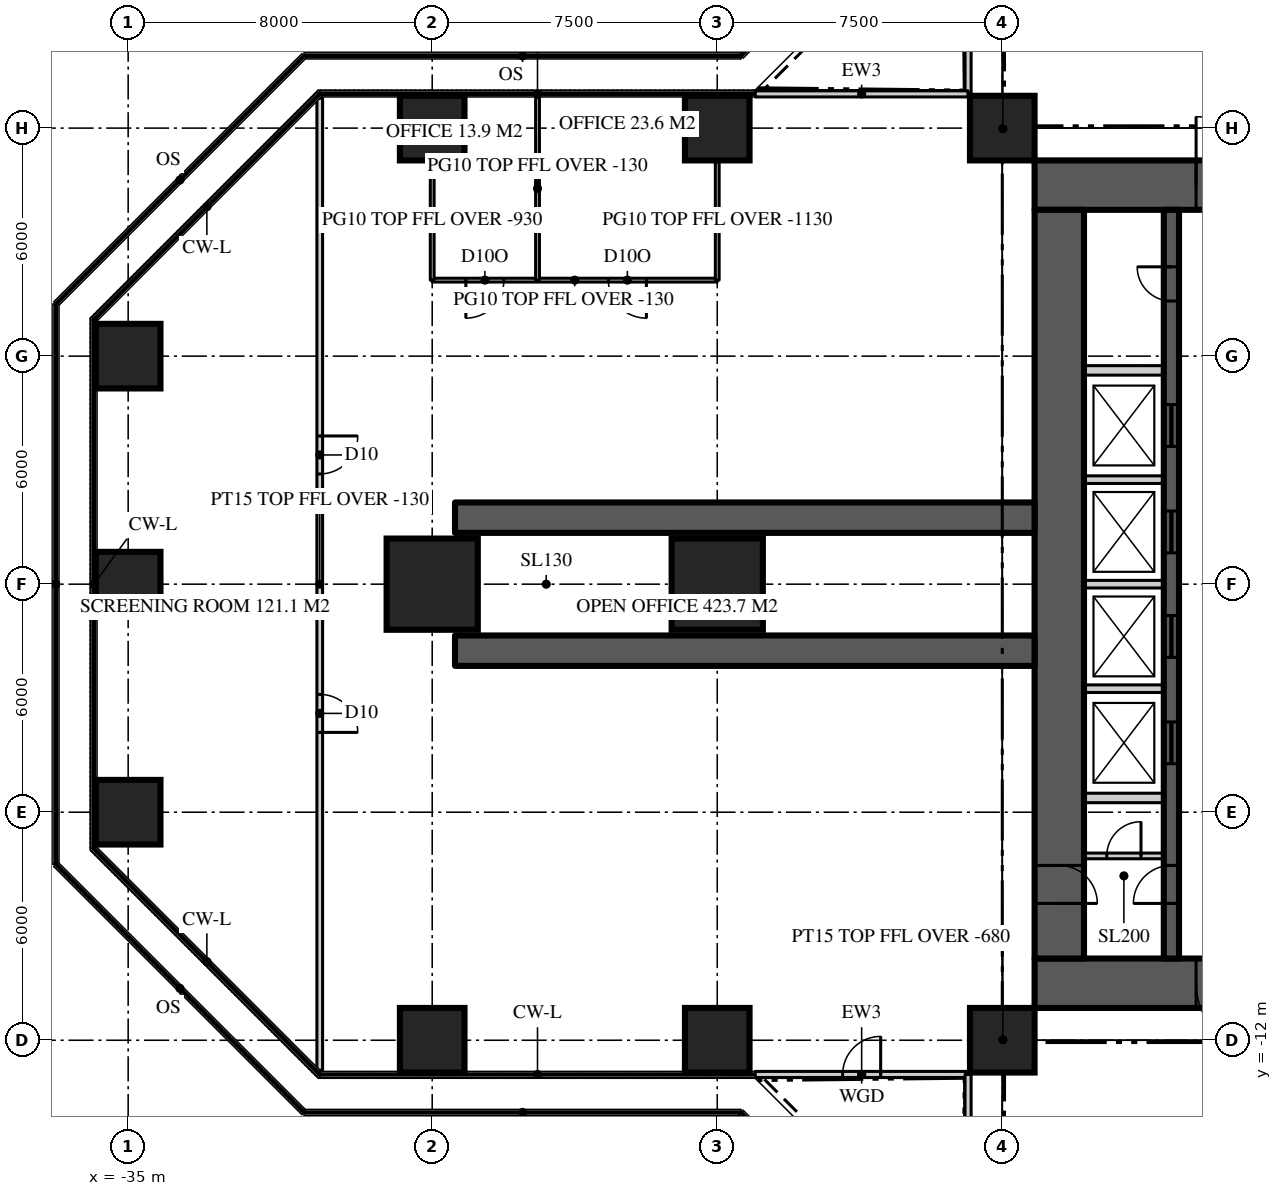
"""IFC4 building model, lengths in metres.
Left out: names, types, materials, properties, quantities, classifications, styles, units other than length and angle.
Written with IfcOpenShell. Run it as: python <this file> out.ifc"""

import sys

from ifc_helpers import new_model, si_unit, direction, frame, frame_2d, origin, origin_2d, place, context, subcontext, project, spatial, rectangle, extrude, element, fill, save


model = new_model("IFC4")
c1 = context("Model", 3, precision=1e-05, world=origin(), true_north=direction((0.0, 1.0)))
c2 = subcontext(c1, "Body", "Model", "MODEL_VIEW")
j1 = project(units=[si_unit("LENGTHUNIT", "METRE"), si_unit("PLANEANGLEUNIT", "RADIAN")], contexts=[c1])
p1 = place(None, origin())
s1 = spatial("IfcSite", under=j1, at=p1, CompositionType="ELEMENT")
p2 = place(p1, origin())
s2 = spatial("IfcBuilding", under=s1, at=p2, CompositionType="ELEMENT")
p3 = place(p2, frame((0.0, 0.0, 86.4)))
s3 = spatial("IfcBuildingStorey", under=s2, at=p3, CompositionType="ELEMENT", Elevation=86.4)
p4 = place(p3, frame((-11.15, 10.5, 0.0), z_axis=(0.0, 0.0, 1.0), x_axis=(1.0, 0.0, 0.0)))
e1 = element("IfcWall", 1, at=p4, inside=s3, PredefinedType="SHEAR", context=c2, shape_type="SweptSolid", body=[
    extrude(rectangle(XDim=22.3, YDim=1.3, at=frame_2d((11.15, 0.0))), origin(), (0.0, 0.0, 1.0), 3.9),
])
p5 = place(p4, frame((4.25, 0.0, 0.0)))
e2 = element("IfcOpeningElement", 2, at=p5, cuts=e1, PredefinedType="OPENING", context=c2, shape_type="SweptSolid", body=[
    extrude(rectangle(XDim=1.8, YDim=2.2, at=frame_2d((0.9, 1.1))), frame((0.0, 0.66, 0.0), z_axis=(0.0, -1.0, 0.0), x_axis=(1.0, 0.0, 0.0)), (0.0, 0.0, 1.0), 1.32),
])
p6 = place(p4, frame((16.25, 0.0, 0.0)))
e3 = element("IfcOpeningElement", 3, at=p6, cuts=e1, PredefinedType="OPENING", context=c2, shape_type="SweptSolid", body=[
    extrude(rectangle(XDim=1.8, YDim=2.2, at=frame_2d((0.9, 1.1))), frame((0.0, 0.66, 0.0), z_axis=(0.0, -1.0, 0.0), x_axis=(1.0, 0.0, 0.0)), (0.0, 0.0, 1.0), 1.32),
])
p7 = place(p3, frame((11.15, -10.5, 0.0), z_axis=(0.0, 0.0, 1.0), x_axis=(-1.0, 0.0, 0.0)))
e4 = element("IfcWall", 4, at=p7, inside=s3, PredefinedType="SHEAR", context=c2, shape_type="SweptSolid", body=[
    extrude(rectangle(XDim=22.3, YDim=1.3, at=frame_2d((11.15, 0.0))), origin(), (0.0, 0.0, 1.0), 3.9),
])
p8 = place(p7, frame((16.25, 0.0, 0.0)))
e5 = element("IfcOpeningElement", 5, at=p8, cuts=e4, PredefinedType="OPENING", context=c2, shape_type="SweptSolid", body=[
    extrude(rectangle(XDim=1.8, YDim=2.2, at=frame_2d((0.9, 1.1))), frame((0.0, 0.66, 0.0), z_axis=(0.0, -1.0, 0.0), x_axis=(1.0, 0.0, 0.0)), (0.0, 0.0, 1.0), 1.32),
])
p9 = place(p7, frame((4.25, 0.0, 0.0)))
e6 = element("IfcOpeningElement", 6, at=p9, cuts=e4, PredefinedType="OPENING", context=c2, shape_type="SweptSolid", body=[
    extrude(rectangle(XDim=1.8, YDim=2.2, at=frame_2d((0.9, 1.1))), frame((0.0, 0.66, 0.0), z_axis=(0.0, -1.0, 0.0), x_axis=(1.0, 0.0, 0.0)), (0.0, 0.0, 1.0), 1.32),
])
p10 = place(p3, frame((-10.5, 9.85, 0.0), z_axis=(0.0, 0.0, 1.0), x_axis=(0.0, -1.0, 0.0)))
e7 = element("IfcWall", 7, at=p10, inside=s3, PredefinedType="SHEAR", context=c2, shape_type="SweptSolid", body=[
    extrude(rectangle(XDim=19.7, YDim=1.3, at=frame_2d((9.85, 0.0))), origin(), (0.0, 0.0, 1.0), 3.9),
])
p11 = place(p10, frame((17.25, 0.0, 0.0)))
e8 = element("IfcOpeningElement", 8, at=p11, cuts=e7, PredefinedType="OPENING", context=c2, shape_type="SweptSolid", body=[
    extrude(rectangle(XDim=1.0, YDim=2.2, at=frame_2d((0.5, 1.1))), frame((0.0, 0.66, 0.0), z_axis=(0.0, -1.0, 0.0), x_axis=(1.0, 0.0, 0.0)), (0.0, 0.0, 1.0), 1.32),
])
for number, where, z_axis, x_axis in (
    (9, (-11.15, 1.75, 0.0), (0.0, 0.0, 1.0), (-1.0, 0.0, 0.0)),
    (10, (-11.15, -1.75, 0.0), (0.0, 0.0, 1.0), (-1.0, 0.0, 0.0)),
):
    element("IfcWall", number, at=place(p3, frame(where, z_axis=z_axis, x_axis=x_axis)), inside=s3, PredefinedType="SHEAR", context=c2, shape_type="SweptSolid", body=[
        extrude(rectangle(XDim=15.25, YDim=0.8, at=frame_2d((7.625, 0.0))), origin(), (0.0, 0.0, 1.0), 3.9),
    ])
for number, where, z_axis, x_axis in (
    (11, (-27.0, -12.0, 0.0), (0.0, 0.0, 1.0), (1.0, 0.0, 0.0)),
    (12, (-19.5, -12.0, 0.0), (0.0, 0.0, 1.0), (1.0, 0.0, 0.0)),
    (13, (-12.0, -12.0, 0.0), (0.0, 0.0, 1.0), (1.0, 0.0, 0.0)),
    (14, (-35.0, -6.0, 0.0), (0.0, 0.0, 1.0), (1.0, 0.0, 0.0)),
    (15, (-35.0, 0.0, 0.0), (0.0, 0.0, 1.0), (1.0, 0.0, 0.0)),
):
    element("IfcColumn", number, at=place(p3, frame(where, z_axis=z_axis, x_axis=x_axis)), inside=s3, PredefinedType="COLUMN", context=c2, shape_type="SweptSolid", body=[
        extrude(rectangle(XDim=1.7, YDim=1.7, at=origin_2d()), origin(), (0.0, 0.0, 1.0), 3.9),
    ])
for number, where, z_axis, x_axis in (
    (16, (-27.0, 0.0, 0.0), (0.0, 0.0, 1.0), (1.0, 0.0, 0.0)),
    (17, (-19.5, 0.0, 0.0), (0.0, 0.0, 1.0), (1.0, 0.0, 0.0)),
):
    element("IfcColumn", number, at=place(p3, frame(where, z_axis=z_axis, x_axis=x_axis)), inside=s3, PredefinedType="COLUMN", context=c2, shape_type="SweptSolid", body=[
        extrude(rectangle(XDim=2.4, YDim=2.4, at=origin_2d()), origin(), (0.0, 0.0, 1.0), 3.9),
    ])
for number, where, z_axis, x_axis in (
    (18, (-35.0, 6.0, 0.0), (0.0, 0.0, 1.0), (1.0, 0.0, 0.0)),
    (19, (-27.0, 12.0, 0.0), (0.0, 0.0, 1.0), (1.0, 0.0, 0.0)),
    (20, (-19.5, 12.0, 0.0), (0.0, 0.0, 1.0), (1.0, 0.0, 0.0)),
    (21, (-12.0, 12.0, 0.0), (0.0, 0.0, 1.0), (1.0, 0.0, 0.0)),
):
    element("IfcColumn", number, at=place(p3, frame(where, z_axis=z_axis, x_axis=x_axis)), inside=s3, PredefinedType="COLUMN", context=c2, shape_type="SweptSolid", body=[
        extrude(rectangle(XDim=1.7, YDim=1.7, at=origin_2d()), origin(), (0.0, 0.0, 1.0), 3.9),
    ])
p12 = place(p3, frame((-12.9, 18.5, 0.0), z_axis=(0.0, 0.0, 1.0), x_axis=(0.0, -1.0, 0.0)))
e22 = element("IfcWall", 22, at=p12, inside=s3, PredefinedType="SOLIDWALL", context=c2, shape_type="SweptSolid", body=[
    extrude(rectangle(XDim=5.6, YDim=0.16, at=frame_2d((2.8, 0.0))), origin(), (0.0, 0.0, 1.0), 3.77),
])
p13 = place(p12, frame((2.3, 0.0, 0.0)))
e23 = element("IfcOpeningElement", 23, at=p13, cuts=e22, PredefinedType="OPENING", context=c2, shape_type="SweptSolid", body=[
    extrude(rectangle(XDim=1.0, YDim=2.2, at=frame_2d((0.5, 1.1))), frame((0.0, 0.09, 0.0), z_axis=(0.0, -1.0, 0.0), x_axis=(1.0, 0.0, 0.0)), (0.0, 0.0, 1.0), 0.18),
])
p14 = place(p3, frame((-12.9, 12.9, 0.0), z_axis=(0.0, 0.0, 1.0), x_axis=(-1.0, 0.0, 0.0)))
e24 = element("IfcWall", 24, at=p14, inside=s3, PredefinedType="SOLIDWALL", context=c2, shape_type="SweptSolid", body=[
    extrude(rectangle(XDim=5.6, YDim=0.16, at=frame_2d((2.8, 0.0))), origin(), (0.0, 0.0, 1.0), 3.77),
])
p15 = place(p3, frame((-18.5, -12.9, 0.0), z_axis=(0.0, 0.0, 1.0), x_axis=(1.0, 0.0, 0.0)))
e25 = element("IfcWall", 25, at=p15, inside=s3, PredefinedType="SOLIDWALL", context=c2, shape_type="SweptSolid", body=[
    extrude(rectangle(XDim=5.6, YDim=0.16, at=frame_2d((2.8, 0.0))), origin(), (0.0, 0.0, 1.0), 3.77),
])
p16 = place(p15, frame((2.3, 0.0, 0.0)))
e26 = element("IfcOpeningElement", 26, at=p16, cuts=e25, PredefinedType="OPENING", context=c2, shape_type="SweptSolid", body=[
    extrude(rectangle(XDim=1.0, YDim=2.2, at=frame_2d((0.5, 1.1))), frame((0.0, 0.09, 0.0), z_axis=(0.0, -1.0, 0.0), x_axis=(1.0, 0.0, 0.0)), (0.0, 0.0, 1.0), 0.18),
])
p17 = place(p3, frame((-12.9, -12.9, 0.0), z_axis=(0.0, 0.0, 1.0), x_axis=(0.0, -1.0, 0.0)))
e27 = element("IfcWall", 27, at=p17, inside=s3, PredefinedType="SOLIDWALL", context=c2, shape_type="SweptSolid", body=[
    extrude(rectangle(XDim=5.6, YDim=0.16, at=frame_2d((2.8, 0.0))), origin(), (0.0, 0.0, 1.0), 3.77),
])
p18 = place(p3, frame((-7.55, -9.85, 0.0), z_axis=(0.0, 0.0, 1.0), x_axis=(0.0, 1.0, 0.0)))
e28 = element("IfcWall", 28, at=p18, inside=s3, PredefinedType="SHEAR", context=c2, shape_type="SweptSolid", body=[
    extrude(rectangle(XDim=19.7, YDim=0.4, at=frame_2d((9.85, 0.0))), origin(), (0.0, 0.0, 1.0), 3.9),
])
p19 = place(p18, frame((1.45, 0.0, 0.0)))
e29 = element("IfcOpeningElement", 29, at=p19, cuts=e28, PredefinedType="OPENING", context=c2, shape_type="SweptSolid", body=[
    extrude(rectangle(XDim=1.0, YDim=2.2, at=frame_2d((0.5, 1.1))), frame((0.0, 0.21, 0.0), z_axis=(0.0, -1.0, 0.0), x_axis=(1.0, 0.0, 0.0)), (0.0, 0.0, 1.0), 0.42),
])
p20 = place(p18, frame((17.3, 0.0, 0.0)))
e30 = element("IfcOpeningElement", 30, at=p20, cuts=e28, PredefinedType="OPENING", context=c2, shape_type="SweptSolid", body=[
    extrude(rectangle(XDim=0.9, YDim=2.1, at=frame_2d((0.45, 1.05))), frame((0.0, 0.21, 0.0), z_axis=(0.0, -1.0, 0.0), x_axis=(1.0, 0.0, 0.0)), (0.0, 0.0, 1.0), 0.42),
])
p21 = place(p18, frame((5.125, 0.0, 0.0)))
e31 = element("IfcOpeningElement", 31, at=p21, cuts=e28, PredefinedType="OPENING", context=c2, shape_type="SweptSolid", body=[
    extrude(rectangle(XDim=1.1, YDim=2.2, at=frame_2d((0.55, 1.1))), frame((0.0, 0.21, 0.0), z_axis=(0.0, -1.0, 0.0), x_axis=(1.0, 0.0, 0.0)), (0.0, 0.0, 1.0), 0.42),
])
p22 = place(p18, frame((7.925, 0.0, 0.0)))
e32 = element("IfcOpeningElement", 32, at=p22, cuts=e28, PredefinedType="OPENING", context=c2, shape_type="SweptSolid", body=[
    extrude(rectangle(XDim=1.1, YDim=2.2, at=frame_2d((0.55, 1.1))), frame((0.0, 0.21, 0.0), z_axis=(0.0, -1.0, 0.0), x_axis=(1.0, 0.0, 0.0)), (0.0, 0.0, 1.0), 0.42),
])
p23 = place(p18, frame((10.675, 0.0, 0.0)))
e33 = element("IfcOpeningElement", 33, at=p23, cuts=e28, PredefinedType="OPENING", context=c2, shape_type="SweptSolid", body=[
    extrude(rectangle(XDim=1.1, YDim=2.2, at=frame_2d((0.55, 1.1))), frame((0.0, 0.21, 0.0), z_axis=(0.0, -1.0, 0.0), x_axis=(1.0, 0.0, 0.0)), (0.0, 0.0, 1.0), 0.42),
])
p24 = place(p18, frame((13.475, 0.0, 0.0)))
e34 = element("IfcOpeningElement", 34, at=p24, cuts=e28, PredefinedType="OPENING", context=c2, shape_type="SweptSolid", body=[
    extrude(rectangle(XDim=1.1, YDim=2.2, at=frame_2d((0.55, 1.1))), frame((0.0, 0.21, 0.0), z_axis=(0.0, -1.0, 0.0), x_axis=(1.0, 0.0, 0.0)), (0.0, 0.0, 1.0), 0.42),
])
for number, where, z_axis, x_axis in (
    (35, (-9.85, 5.625, 0.0), (0.0, 0.0, 1.0), (1.0, 0.0, 0.0)),
    (36, (-9.85, -5.625, 0.0), (0.0, 0.0, 1.0), (1.0, 0.0, 0.0)),
):
    element("IfcWall", number, at=place(p3, frame(where, z_axis=z_axis, x_axis=x_axis)), inside=s3, PredefinedType="SOLIDWALL", context=c2, shape_type="SweptSolid", body=[
        extrude(rectangle(XDim=2.1, YDim=0.25, at=frame_2d((1.05, 0.0))), origin(), (0.0, 0.0, 1.0), 3.7),
    ])
for number, where, z_axis, x_axis in (
    (37, (-9.85, -2.75, 0.0), (0.0, 0.0, 1.0), (1.0, 0.0, 0.0)),
    (38, (-9.85, 0.0, 0.0), (0.0, 0.0, 1.0), (1.0, 0.0, 0.0)),
    (39, (-9.85, 2.75, 0.0), (0.0, 0.0, 1.0), (1.0, 0.0, 0.0)),
):
    element("IfcWall", number, at=place(p3, frame(where, z_axis=z_axis, x_axis=x_axis)), inside=s3, PredefinedType="SOLIDWALL", context=c2, shape_type="SweptSolid", body=[
        extrude(rectangle(XDim=2.1, YDim=0.2, at=frame_2d((1.05, 0.0))), origin(), (0.0, 0.0, 1.0), 3.7),
    ])
p25 = place(p3, frame((-29.959, 12.786, 0.0), z_axis=(0.0, 0.0, 1.0), x_axis=(0.0, -1.0, 0.0)))
e40 = element("IfcWall", 40, at=p25, inside=s3, PredefinedType="PARTITIONING", context=c2, shape_type="SweptSolid", body=[
    extrude(rectangle(XDim=25.573, YDim=0.15, at=frame_2d((12.786, 0.0))), origin(), (0.0, 0.0, 1.0), 3.77),
])
p26 = place(p25, frame((15.687, 0.0, 0.0)))
e41 = element("IfcOpeningElement", 41, at=p26, cuts=e40, PredefinedType="OPENING", context=c2, shape_type="SweptSolid", body=[
    extrude(rectangle(XDim=1.0, YDim=2.2, at=frame_2d((0.5, 1.1))), frame((0.0, 0.085, 0.0), z_axis=(0.0, -1.0, 0.0), x_axis=(1.0, 0.0, 0.0)), (0.0, 0.0, 1.0), 0.17),
])
p27 = place(p25, frame((8.886, 0.0, 0.0)))
e42 = element("IfcOpeningElement", 42, at=p27, cuts=e40, PredefinedType="OPENING", context=c2, shape_type="SweptSolid", body=[
    extrude(rectangle(XDim=1.0, YDim=2.2, at=frame_2d((0.5, 1.1))), frame((0.0, 0.085, 0.0), z_axis=(0.0, -1.0, 0.0), x_axis=(1.0, 0.0, 0.0)), (0.0, 0.0, 1.0), 0.17),
])
p28 = place(p3, frame((-19.5, 8.0, 0.0), z_axis=(0.0, 0.0, 1.0), x_axis=(-1.0, 0.0, 0.0)))
e43 = element("IfcWall", 43, at=p28, inside=s3, PredefinedType="PARTITIONING", context=c2, shape_type="SweptSolid", body=[
    extrude(rectangle(XDim=7.5, YDim=0.1, at=frame_2d((3.75, 0.0))), origin(), (0.0, 0.0, 1.0), 3.77),
])
p29 = place(p28, frame((1.865, 0.0, 0.0)))
e44 = element("IfcOpeningElement", 44, at=p29, cuts=e43, PredefinedType="OPENING", context=c2, shape_type="SweptSolid", body=[
    extrude(rectangle(XDim=1.0, YDim=2.2, at=frame_2d((0.5, 1.1))), frame((0.0, 0.06, 0.0), z_axis=(0.0, -1.0, 0.0), x_axis=(1.0, 0.0, 0.0)), (0.0, 0.0, 1.0), 0.12),
])
p30 = place(p28, frame((5.615, 0.0, 0.0)))
e45 = element("IfcOpeningElement", 45, at=p30, cuts=e43, PredefinedType="OPENING", context=c2, shape_type="SweptSolid", body=[
    extrude(rectangle(XDim=1.0, YDim=2.2, at=frame_2d((0.5, 1.1))), frame((0.0, 0.06, 0.0), z_axis=(0.0, -1.0, 0.0), x_axis=(1.0, 0.0, 0.0)), (0.0, 0.0, 1.0), 0.12),
])
p31 = place(p3, frame((-19.5, 8.0, 0.0), z_axis=(0.0, 0.0, 1.0), x_axis=(0.0, 1.0, 0.0)))
e46 = element("IfcWall", 46, at=p31, inside=s3, PredefinedType="PARTITIONING", context=c2, shape_type="SweptSolid", body=[
    extrude(rectangle(XDim=3.15, YDim=0.1, at=frame_2d((1.575, 0.0))), origin(), (0.0, 0.0, 1.0), 2.77),
])
p32 = place(p3, frame((-24.229, 8.0, 0.0), z_axis=(0.0, 0.0, 1.0), x_axis=(0.0, 1.0, 0.0)))
e47 = element("IfcWall", 47, at=p32, inside=s3, PredefinedType="PARTITIONING", context=c2, shape_type="SweptSolid", body=[
    extrude(rectangle(XDim=4.82, YDim=0.1, at=frame_2d((2.41, 0.0))), origin(), (0.0, 0.0, 1.0), 3.77),
])
p33 = place(p3, frame((-27.0, 8.0, 0.0), z_axis=(0.0, 0.0, 1.0), x_axis=(0.0, 1.0, 0.0)))
e48 = element("IfcWall", 48, at=p33, inside=s3, PredefinedType="PARTITIONING", context=c2, shape_type="SweptSolid", body=[
    extrude(rectangle(XDim=3.15, YDim=0.1, at=frame_2d((1.575, 0.0))), origin(), (0.0, 0.0, 1.0), 2.97),
])
for number, where, z_axis, x_axis in (
    (49, (-11.15, 11.15, 0.0), (0.0, 0.0, 1.0), (-0.707, 0.707, 0.0)),
    (50, (-11.15, -11.15, 0.0), (0.0, 0.0, 1.0), (-0.707, -0.707, 0.0)),
):
    element("IfcWall", number, at=place(p3, frame(where, z_axis=z_axis, x_axis=x_axis)), inside=s3, PredefinedType="PARTITIONING", context=c2, shape_type="SweptSolid", body=[
        extrude(rectangle(XDim=2.362, YDim=0.15, at=frame_2d((1.181, 0.0))), origin(), (0.0, 0.0, 1.0), 3.22),
    ])
p34 = place(p3, frame((-9.85, -7.15, 0.0), z_axis=(0.0, 0.0, 1.0), x_axis=(1.0, 0.0, 0.0)))
e51 = element("IfcWall", 51, at=p34, inside=s3, PredefinedType="SOLIDWALL", context=c2, shape_type="SweptSolid", body=[
    extrude(rectangle(XDim=2.1, YDim=0.15, at=frame_2d((1.05, 0.0))), origin(), (0.0, 0.0, 1.0), 3.77),
])
p35 = place(p34, frame((0.6, 0.0, 0.0)))
e52 = element("IfcOpeningElement", 52, at=p35, cuts=e51, PredefinedType="OPENING", context=c2, shape_type="SweptSolid", body=[
    extrude(rectangle(XDim=0.9, YDim=2.1, at=frame_2d((0.45, 1.05))), frame((0.0, 0.085, 0.0), z_axis=(0.0, -1.0, 0.0), x_axis=(1.0, 0.0, 0.0)), (0.0, 0.0, 1.0), 0.17),
])
p36 = place(p16, origin())
e53 = element("IfcDoor", 53, at=p36, inside=s3, OperationType="SINGLE_SWING_RIGHT", PredefinedType="DOOR", context=c2, shape_type="SweptSolid", body=[
    extrude(rectangle(XDim=1.0, YDim=2.2, at=frame_2d((0.5, 1.1))), frame((0.0, 0.025, 0.0), z_axis=(0.0, -1.0, 0.0), x_axis=(1.0, 0.0, 0.0)), (0.0, 0.0, 1.0), 0.05),
])
fill(e26, e53)
p37 = place(p5, origin())
e54 = element("IfcDoor", 54, at=p37, inside=s3, OperationType="DOUBLE_DOOR_DOUBLE_SWING", PredefinedType="DOOR", context=c2, shape_type="SweptSolid", body=[
    extrude(rectangle(XDim=1.8, YDim=2.2, at=frame_2d((0.9, 1.1))), frame((0.0, 0.025, 0.0), z_axis=(0.0, -1.0, 0.0), x_axis=(1.0, 0.0, 0.0)), (0.0, 0.0, 1.0), 0.05),
])
fill(e2, e54)
p38 = place(p8, origin())
e55 = element("IfcDoor", 55, at=p38, inside=s3, OperationType="DOUBLE_DOOR_DOUBLE_SWING", PredefinedType="DOOR", context=c2, shape_type="SweptSolid", body=[
    extrude(rectangle(XDim=1.8, YDim=2.2, at=frame_2d((0.9, 1.1))), frame((0.0, 0.025, 0.0), z_axis=(0.0, -1.0, 0.0), x_axis=(1.0, 0.0, 0.0)), (0.0, 0.0, 1.0), 0.05),
])
fill(e5, e55)
p39 = place(p19, origin())
e56 = element("IfcDoor", 56, at=p39, inside=s3, OperationType="SINGLE_SWING_LEFT", PredefinedType="DOOR", context=c2, shape_type="SweptSolid", body=[
    extrude(rectangle(XDim=1.0, YDim=2.2, at=frame_2d((0.5, 1.1))), frame((0.0, 0.025, 0.0), z_axis=(0.0, -1.0, 0.0), x_axis=(1.0, 0.0, 0.0)), (0.0, 0.0, 1.0), 0.05),
])
fill(e29, e56)
p40 = place(p11, origin())
e57 = element("IfcDoor", 57, at=p40, inside=s3, OperationType="SINGLE_SWING_RIGHT", PredefinedType="DOOR", context=c2, shape_type="SweptSolid", body=[
    extrude(rectangle(XDim=1.0, YDim=2.2, at=frame_2d((0.5, 1.1))), frame((0.0, 0.025, 0.0), z_axis=(0.0, -1.0, 0.0), x_axis=(1.0, 0.0, 0.0)), (0.0, 0.0, 1.0), 0.05),
])
fill(e8, e57)
p41 = place(p20, origin())
e58 = element("IfcDoor", 58, at=p41, inside=s3, OperationType="SINGLE_SWING_RIGHT", PredefinedType="DOOR", context=c2, shape_type="SweptSolid", body=[
    extrude(rectangle(XDim=0.9, YDim=2.1, at=frame_2d((0.45, 1.05))), frame((0.0, 0.025, 0.0), z_axis=(0.0, -1.0, 0.0), x_axis=(1.0, 0.0, 0.0)), (0.0, 0.0, 1.0), 0.05),
])
fill(e30, e58)
p42 = place(p21, origin())
e59 = element("IfcDoor", 59, at=p42, inside=s3, OperationType="SLIDING_TO_LEFT", PredefinedType="DOOR", context=c2, shape_type="SweptSolid", body=[
    extrude(rectangle(XDim=1.1, YDim=2.2, at=frame_2d((0.55, 1.1))), frame((0.0, 0.025, 0.0), z_axis=(0.0, -1.0, 0.0), x_axis=(1.0, 0.0, 0.0)), (0.0, 0.0, 1.0), 0.05),
])
fill(e31, e59)
p43 = place(p22, origin())
e60 = element("IfcDoor", 60, at=p43, inside=s3, OperationType="SLIDING_TO_LEFT", PredefinedType="DOOR", context=c2, shape_type="SweptSolid", body=[
    extrude(rectangle(XDim=1.1, YDim=2.2, at=frame_2d((0.55, 1.1))), frame((0.0, 0.025, 0.0), z_axis=(0.0, -1.0, 0.0), x_axis=(1.0, 0.0, 0.0)), (0.0, 0.0, 1.0), 0.05),
])
fill(e32, e60)
p44 = place(p23, origin())
e61 = element("IfcDoor", 61, at=p44, inside=s3, OperationType="SLIDING_TO_LEFT", PredefinedType="DOOR", context=c2, shape_type="SweptSolid", body=[
    extrude(rectangle(XDim=1.1, YDim=2.2, at=frame_2d((0.55, 1.1))), frame((0.0, 0.025, 0.0), z_axis=(0.0, -1.0, 0.0), x_axis=(1.0, 0.0, 0.0)), (0.0, 0.0, 1.0), 0.05),
])
fill(e33, e61)
p45 = place(p24, origin())
e62 = element("IfcDoor", 62, at=p45, inside=s3, OperationType="SLIDING_TO_LEFT", PredefinedType="DOOR", context=c2, shape_type="SweptSolid", body=[
    extrude(rectangle(XDim=1.1, YDim=2.2, at=frame_2d((0.55, 1.1))), frame((0.0, 0.025, 0.0), z_axis=(0.0, -1.0, 0.0), x_axis=(1.0, 0.0, 0.0)), (0.0, 0.0, 1.0), 0.05),
])
fill(e34, e62)
p46 = place(p26, origin())
e63 = element("IfcDoor", 63, at=p46, inside=s3, OperationType="SINGLE_SWING_RIGHT", PredefinedType="DOOR", context=c2, shape_type="SweptSolid", body=[
    extrude(rectangle(XDim=1.0, YDim=2.2, at=frame_2d((0.5, 1.1))), frame((0.0, 0.025, 0.0), z_axis=(0.0, -1.0, 0.0), x_axis=(1.0, 0.0, 0.0)), (0.0, 0.0, 1.0), 0.05),
])
fill(e41, e63)
p47 = place(p27, origin())
e64 = element("IfcDoor", 64, at=p47, inside=s3, OperationType="SINGLE_SWING_LEFT", PredefinedType="DOOR", context=c2, shape_type="SweptSolid", body=[
    extrude(rectangle(XDim=1.0, YDim=2.2, at=frame_2d((0.5, 1.1))), frame((0.0, 0.025, 0.0), z_axis=(0.0, -1.0, 0.0), x_axis=(1.0, 0.0, 0.0)), (0.0, 0.0, 1.0), 0.05),
])
fill(e42, e64)
p48 = place(p29, origin())
e65 = element("IfcDoor", 65, at=p48, inside=s3, OperationType="SINGLE_SWING_LEFT", PredefinedType="DOOR", context=c2, shape_type="SweptSolid", body=[
    extrude(rectangle(XDim=1.0, YDim=2.2, at=frame_2d((0.5, 1.1))), frame((0.0, 0.025, 0.0), z_axis=(0.0, -1.0, 0.0), x_axis=(1.0, 0.0, 0.0)), (0.0, 0.0, 1.0), 0.05),
])
fill(e44, e65)
p49 = place(p30, origin())
e66 = element("IfcDoor", 66, at=p49, inside=s3, OperationType="SINGLE_SWING_RIGHT", PredefinedType="DOOR", context=c2, shape_type="SweptSolid", body=[
    extrude(rectangle(XDim=1.0, YDim=2.2, at=frame_2d((0.5, 1.1))), frame((0.0, 0.025, 0.0), z_axis=(0.0, -1.0, 0.0), x_axis=(1.0, 0.0, 0.0)), (0.0, 0.0, 1.0), 0.05),
])
fill(e45, e66)
p50 = place(p35, origin())
e67 = element("IfcDoor", 67, at=p50, inside=s3, OperationType="SINGLE_SWING_RIGHT", PredefinedType="DOOR", context=c2, shape_type="SweptSolid", body=[
    extrude(rectangle(XDim=0.9, YDim=2.1, at=frame_2d((0.45, 1.05))), frame((0.0, 0.025, 0.0), z_axis=(0.0, -1.0, 0.0), x_axis=(1.0, 0.0, 0.0)), (0.0, 0.0, 1.0), 0.05),
])
fill(e52, e67)
save(model, sys.argv[1])
